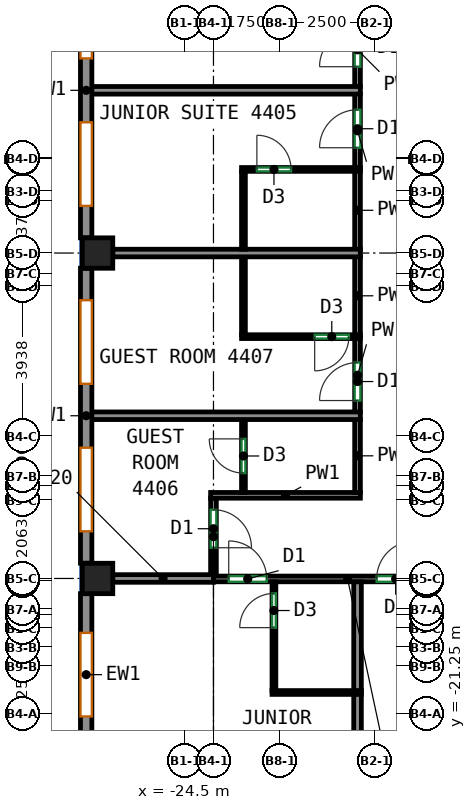
"""IFC4 building model, lengths in metres.
Left out: names, types, materials, properties, quantities, classifications, styles, units other than length and angle.
Written with IfcOpenShell. Run it as: python <this file> out.ifc"""

import sys

from ifc_helpers import new_model, si_unit, direction, frame, frame_2d, origin, origin_2d, place, context, subcontext, project, spatial, rectangle, extrude, source, transform, mapped, element, fill, save


model = new_model("IFC4")
c1 = context("Model", 3, precision=1e-05, world=origin(), true_north=direction((0.0, 1.0)))
c2 = subcontext(c1, "Body", "Model", "MODEL_VIEW")
j1 = project(units=[si_unit("LENGTHUNIT", "METRE"), si_unit("PLANEANGLEUNIT", "RADIAN")], contexts=[c1])
p1 = place(None, origin())
s1 = spatial("IfcSite", under=j1, at=p1, CompositionType="ELEMENT")
p2 = place(p1, origin())
s2 = spatial("IfcBuilding", under=s1, at=p2, CompositionType="ELEMENT")
p3 = place(p2, frame((0.0, 0.0, 185.5)))
s3 = spatial("IfcBuildingStorey", under=s2, at=p3, CompositionType="ELEMENT", Elevation=185.5)
m1 = source(origin(), c2, "Body", "SweptSolid", [
    extrude(rectangle(XDim=0.8, YDim=0.8, at=origin_2d()), origin(), (0.0, 0.0, 1.0), 3.12),
])
for number, where, z_axis, x_axis in (
    (1, (-26.8, -17.688, 0.0), (0.0, 0.0, 1.0), (1.0, 0.0, 0.0)),
    (2, (-26.8, -9.125, 0.0), (0.0, 0.0, 1.0), (1.0, 0.0, 0.0)),
):
    element("IfcColumn", number, at=place(p3, frame(where, z_axis=z_axis, x_axis=x_axis)), inside=s3, PredefinedType="COLUMN", context=c2, shape_type="MappedRepresentation", body=[
        mapped(m1, transform((0.0, 0.0, 0.0))),
    ])
m2 = source(origin(), c2, "Body", "SweptSolid", [
    extrude(rectangle(XDim=7.763, YDim=0.3, at=frame_2d((3.881, 0.0))), origin(), (0.0, 0.0, 1.0), 3.12),
])
p4 = place(p3, frame((-27.1, -0.962, 0.0), z_axis=(0.0, 0.0, 1.0), x_axis=(0.0, -1.0, 0.0)))
e3 = element("IfcWall", 3, at=p4, inside=s3, PredefinedType="SOLIDWALL", context=c2, shape_type="MappedRepresentation", body=[
    mapped(m2, transform((0.0, 0.0, 0.0))),
])
p5 = place(p4, frame((0.841, 0.0, 0.85)))
e4 = element("IfcOpeningElement", 4, at=p5, cuts=e3, PredefinedType="OPENING", context=c2, shape_type="SweptSolid", body=[
    extrude(rectangle(XDim=2.2, YDim=1.95, at=frame_2d((1.1, 0.975))), frame((0.0, 0.16, 0.0), z_axis=(0.0, -1.0, 0.0), x_axis=(1.0, 0.0, 0.0)), (0.0, 0.0, 1.0), 0.32),
])
p6 = place(p4, frame((4.722, 0.0, 0.85)))
e5 = element("IfcOpeningElement", 5, at=p6, cuts=e3, PredefinedType="OPENING", context=c2, shape_type="SweptSolid", body=[
    extrude(rectangle(XDim=2.2, YDim=1.95, at=frame_2d((1.1, 0.975))), frame((0.0, 0.16, 0.0), z_axis=(0.0, -1.0, 0.0), x_axis=(1.0, 0.0, 0.0)), (0.0, 0.0, 1.0), 0.32),
])
p7 = place(p3, frame((-27.1, -9.525, 0.0), z_axis=(0.0, 0.0, 1.0), x_axis=(0.0, -1.0, 0.0)))
e6 = element("IfcWall", 6, at=p7, inside=s3, PredefinedType="SOLIDWALL", context=c2, shape_type="MappedRepresentation", body=[
    mapped(m2, transform((0.0, 0.0, 0.0))),
])
p8 = place(p7, frame((0.841, 0.0, 0.85)))
e7 = element("IfcOpeningElement", 7, at=p8, cuts=e6, PredefinedType="OPENING", context=c2, shape_type="SweptSolid", body=[
    extrude(rectangle(XDim=2.2, YDim=1.95, at=frame_2d((1.1, 0.975))), frame((0.0, 0.16, 0.0), z_axis=(0.0, -1.0, 0.0), x_axis=(1.0, 0.0, 0.0)), (0.0, 0.0, 1.0), 0.32),
])
p9 = place(p7, frame((4.722, 0.0, 0.85)))
e8 = element("IfcOpeningElement", 8, at=p9, cuts=e6, PredefinedType="OPENING", context=c2, shape_type="SweptSolid", body=[
    extrude(rectangle(XDim=2.2, YDim=1.95, at=frame_2d((1.1, 0.975))), frame((0.0, 0.16, 0.0), z_axis=(0.0, -1.0, 0.0), x_axis=(1.0, 0.0, 0.0)), (0.0, 0.0, 1.0), 0.32),
])
m3 = source(origin(), c2, "Body", "SweptSolid", [
    extrude(rectangle(XDim=4.263, YDim=0.3, at=frame_2d((2.131, 0.0))), origin(), (0.0, 0.0, 1.0), 3.12),
])
p10 = place(p3, frame((-27.1, -18.087, 0.0), z_axis=(0.0, 0.0, 1.0), x_axis=(0.0, -1.0, 0.0)))
e9 = element("IfcWall", 9, at=p10, inside=s3, PredefinedType="SOLIDWALL", context=c2, shape_type="MappedRepresentation", body=[
    mapped(m3, transform((0.0, 0.0, 0.0))),
])
p11 = place(p10, frame((1.031, 0.0, 0.85)))
e10 = element("IfcOpeningElement", 10, at=p11, cuts=e9, PredefinedType="OPENING", context=c2, shape_type="SweptSolid", body=[
    extrude(rectangle(XDim=2.2, YDim=1.95, at=frame_2d((1.1, 0.975))), frame((0.0, 0.16, 0.0), z_axis=(0.0, -1.0, 0.0), x_axis=(1.0, 0.0, 0.0)), (0.0, 0.0, 1.0), 0.32),
])
p12 = place(p3, frame((-23.75, -17.7, 0.0), z_axis=(0.0, 0.0, 1.0), x_axis=(1.0, 0.0, 0.0)))
e11 = element("IfcWall", 11, at=p12, inside=s3, PredefinedType="PARTITIONING", context=c2, shape_type="SweptSolid", body=[
    extrude(rectangle(XDim=7.058, YDim=0.15, at=frame_2d((3.529, 0.0))), origin(), (0.0, 0.0, 1.0), 2.52),
])
p13 = place(p12, frame((0.401, 0.0, 0.0)))
e12 = element("IfcOpeningElement", 12, at=p13, cuts=e11, PredefinedType="OPENING", context=c2, shape_type="SweptSolid", body=[
    extrude(rectangle(XDim=1.0, YDim=2.1, at=frame_2d((0.5, 1.05))), frame((0.0, 0.085, 0.0), z_axis=(0.0, -1.0, 0.0), x_axis=(1.0, 0.0, 0.0)), (0.0, 0.0, 1.0), 0.17),
])
p14 = place(p12, frame((4.294, 0.0, 0.0)))
e13 = element("IfcOpeningElement", 13, at=p14, cuts=e11, PredefinedType="OPENING", context=c2, shape_type="SweptSolid", body=[
    extrude(rectangle(XDim=1.0, YDim=2.1, at=frame_2d((0.5, 1.05))), frame((0.0, 0.085, 0.0), z_axis=(0.0, -1.0, 0.0), x_axis=(1.0, 0.0, 0.0)), (0.0, 0.0, 1.0), 0.17),
])
p15 = place(p3, frame((-23.75, -15.575, 0.0), z_axis=(0.0, 0.0, 1.0), x_axis=(0.0, -1.0, 0.0)))
e14 = element("IfcWall", 14, at=p15, inside=s3, PredefinedType="PARTITIONING", context=c2, shape_type="SweptSolid", body=[
    extrude(rectangle(XDim=2.023, YDim=0.15, at=frame_2d((1.011, 0.0))), origin(), (0.0, 0.0, 1.0), 2.52),
])
p16 = place(p15, frame((0.304, 0.0, 0.0)))
e15 = element("IfcOpeningElement", 15, at=p16, cuts=e14, PredefinedType="OPENING", context=c2, shape_type="SweptSolid", body=[
    extrude(rectangle(XDim=1.0, YDim=2.1, at=frame_2d((0.5, 1.05))), frame((0.0, 0.085, 0.0), z_axis=(0.0, -1.0, 0.0), x_axis=(1.0, 0.0, 0.0)), (0.0, 0.0, 1.0), 0.17),
])
p17 = place(p3, frame((-23.825, -15.5, 0.0), z_axis=(0.0, 0.0, 1.0), x_axis=(1.0, 0.0, 0.0)))
e16 = element("IfcWall", 16, at=p17, inside=s3, PredefinedType="PARTITIONING", context=c2, shape_type="SweptSolid", body=[
    extrude(rectangle(XDim=3.941, YDim=0.15, at=frame_2d((1.97, 0.0))), origin(), (0.0, 0.0, 1.0), 3.12),
])
p18 = place(p3, frame((-19.959, -15.425, 0.0), z_axis=(0.0, 0.0, 1.0), x_axis=(0.0, 1.0, 0.0)))
e17 = element("IfcWall", 17, at=p18, inside=s3, PredefinedType="PARTITIONING", context=c2, shape_type="SweptSolid", body=[
    extrude(rectangle(XDim=1.929, YDim=0.15, at=frame_2d((0.964, 0.0))), origin(), (0.0, 0.0, 1.0), 3.12),
])
p19 = place(p3, frame((-19.959, -13.316, 0.0), z_axis=(0.0, 0.0, 1.0), x_axis=(0.0, 1.0, 0.0)))
e18 = element("IfcWall", 18, at=p19, inside=s3, PredefinedType="PARTITIONING", context=c2, shape_type="SweptSolid", body=[
    extrude(rectangle(XDim=1.951, YDim=0.15, at=frame_2d((0.976, 0.0))), origin(), (0.0, 0.0, 1.0), 3.12),
])
p20 = place(p19, frame((0.31, 0.0, 0.0)))
e19 = element("IfcOpeningElement", 19, at=p20, cuts=e18, PredefinedType="OPENING", context=c2, shape_type="SweptSolid", body=[
    extrude(rectangle(XDim=1.0, YDim=2.1, at=frame_2d((0.5, 1.05))), frame((0.0, 0.085, 0.0), z_axis=(0.0, -1.0, 0.0), x_axis=(1.0, 0.0, 0.0)), (0.0, 0.0, 1.0), 0.17),
])
p21 = place(p3, frame((-19.959, -11.285, 0.0), z_axis=(0.0, 0.0, 1.0), x_axis=(0.0, 1.0, 0.0)))
e20 = element("IfcWall", 20, at=p21, inside=s3, PredefinedType="PARTITIONING", context=c2, shape_type="SweptSolid", body=[
    extrude(rectangle(XDim=2.07, YDim=0.15, at=frame_2d((1.035, 0.0))), origin(), (0.0, 0.0, 1.0), 3.12),
])
p22 = place(p3, frame((-19.959, -6.885, 0.0), z_axis=(0.0, 0.0, 1.0), x_axis=(0.0, 1.0, 0.0)))
e21 = element("IfcWall", 21, at=p22, inside=s3, PredefinedType="PARTITIONING", context=c2, shape_type="SweptSolid", body=[
    extrude(rectangle(XDim=1.952, YDim=0.15, at=frame_2d((0.976, 0.0))), origin(), (0.0, 0.0, 1.0), 3.12),
])
p23 = place(p22, frame((0.531, 0.0, 0.0)))
e22 = element("IfcOpeningElement", 22, at=p23, cuts=e21, PredefinedType="OPENING", context=c2, shape_type="SweptSolid", body=[
    extrude(rectangle(XDim=1.0, YDim=2.1, at=frame_2d((0.5, 1.05))), frame((0.0, 0.085, 0.0), z_axis=(0.0, -1.0, 0.0), x_axis=(1.0, 0.0, 0.0)), (0.0, 0.0, 1.0), 0.17),
])
p24 = place(p3, frame((-19.959, -9.035, 0.0), z_axis=(0.0, 0.0, 1.0), x_axis=(0.0, 1.0, 0.0)))
e23 = element("IfcWall", 23, at=p24, inside=s3, PredefinedType="PARTITIONING", context=c2, shape_type="SweptSolid", body=[
    extrude(rectangle(XDim=2.07, YDim=0.15, at=frame_2d((1.035, 0.0))), origin(), (0.0, 0.0, 1.0), 3.12),
])
p25 = place(p3, frame((-19.959, -4.753, 0.0), z_axis=(0.0, 0.0, 1.0), x_axis=(0.0, 1.0, 0.0)))
e24 = element("IfcWall", 24, at=p25, inside=s3, PredefinedType="PARTITIONING", context=c2, shape_type="SweptSolid", body=[
    extrude(rectangle(XDim=1.951, YDim=0.15, at=frame_2d((0.976, 0.0))), origin(), (0.0, 0.0, 1.0), 3.12),
])
p26 = place(p25, frame((0.531, 0.0, 0.0)))
e25 = element("IfcOpeningElement", 25, at=p26, cuts=e24, PredefinedType="OPENING", context=c2, shape_type="SweptSolid", body=[
    extrude(rectangle(XDim=1.0, YDim=2.1, at=frame_2d((0.5, 1.05))), frame((0.0, 0.085, 0.0), z_axis=(0.0, -1.0, 0.0), x_axis=(1.0, 0.0, 0.0)), (0.0, 0.0, 1.0), 0.17),
])
p27 = place(p3, frame((-22.159, -20.638, 0.0), z_axis=(0.0, 0.0, 1.0), x_axis=(0.0, 1.0, 0.0)))
e26 = element("IfcWall", 26, at=p27, inside=s3, PredefinedType="PARTITIONING", context=c2, shape_type="SweptSolid", body=[
    extrude(rectangle(XDim=2.861, YDim=0.1, at=frame_2d((1.43, 0.0))), origin(), (0.0, 0.0, 1.0), 3.12),
])
p28 = place(p27, frame((1.657, 0.0, 0.0)))
e27 = element("IfcOpeningElement", 27, at=p28, cuts=e26, PredefinedType="OPENING", context=c2, shape_type="SweptSolid", body=[
    extrude(rectangle(XDim=0.9, YDim=2.1, at=frame_2d((0.45, 1.05))), frame((0.0, 0.06, 0.0), z_axis=(0.0, -1.0, 0.0), x_axis=(1.0, 0.0, 0.0)), (0.0, 0.0, 1.0), 0.12),
])
p29 = place(p3, frame((-22.209, -20.688, 0.0), z_axis=(0.0, 0.0, 1.0), x_axis=(1.0, 0.0, 0.0)))
e28 = element("IfcWall", 28, at=p29, inside=s3, PredefinedType="PARTITIONING", context=c2, shape_type="SweptSolid", body=[
    extrude(rectangle(XDim=2.35, YDim=0.1, at=frame_2d((1.175, 0.0))), origin(), (0.0, 0.0, 1.0), 3.12),
])
p30 = place(p3, frame((-19.959, -26.0, 0.0), z_axis=(0.0, 0.0, 1.0), x_axis=(0.0, 1.0, 0.0)))
e29 = element("IfcWall", 29, at=p30, inside=s3, PredefinedType="PARTITIONING", context=c2, shape_type="SweptSolid", body=[
    extrude(rectangle(XDim=5.262, YDim=0.2, at=frame_2d((2.631, 0.0))), origin(), (0.0, 0.0, 1.0), 3.12),
])
p31 = place(p3, frame((-26.4, -17.688, 0.0), z_axis=(0.0, 0.0, 1.0), x_axis=(1.0, 0.0, 0.0)))
e30 = element("IfcWall", 30, at=p31, inside=s3, PredefinedType="PARTITIONING", context=c2, shape_type="SweptSolid", body=[
    extrude(rectangle(XDim=2.648, YDim=0.2, at=frame_2d((1.324, 0.0))), origin(), (0.0, 0.0, 1.0), 2.52),
])
p32 = place(p3, frame((-19.959, -20.638, 0.0), z_axis=(0.0, 0.0, 1.0), x_axis=(0.0, 1.0, 0.0)))
e31 = element("IfcWall", 31, at=p32, inside=s3, PredefinedType="PARTITIONING", context=c2, shape_type="SweptSolid", body=[
    extrude(rectangle(XDim=2.861, YDim=0.2, at=frame_2d((1.43, 0.0))), origin(), (0.0, 0.0, 1.0), 3.12),
])
p33 = place(p3, frame((-22.961, -15.423, 0.0), z_axis=(0.0, 0.0, 1.0), x_axis=(0.0, 1.0, 0.0)))
e32 = element("IfcWall", 32, at=p33, inside=s3, PredefinedType="PARTITIONING", context=c2, shape_type="SweptSolid", body=[
    extrude(rectangle(XDim=1.917, YDim=0.1, at=frame_2d((0.958, 0.0))), origin(), (0.0, 0.0, 1.0), 3.12),
])
p34 = place(p33, frame((0.508, 0.0, 0.0)))
e33 = element("IfcOpeningElement", 33, at=p34, cuts=e32, PredefinedType="OPENING", context=c2, shape_type="SweptSolid", body=[
    extrude(rectangle(XDim=0.9, YDim=2.1, at=frame_2d((0.45, 1.05))), frame((0.0, 0.06, 0.0), z_axis=(0.0, -1.0, 0.0), x_axis=(1.0, 0.0, 0.0)), (0.0, 0.0, 1.0), 0.12),
])
p35 = place(p3, frame((-27.0, -13.406, 0.0), z_axis=(0.0, 0.0, 1.0), x_axis=(1.0, 0.0, 0.0)))
e34 = element("IfcWall", 34, at=p35, inside=s3, PredefinedType="PARTITIONING", context=c2, shape_type="SweptSolid", body=[
    extrude(rectangle(XDim=7.114, YDim=0.2, at=frame_2d((3.557, 0.0))), origin(), (0.0, 0.0, 1.0), 3.12),
])
p36 = place(p3, frame((-19.886, -11.325, 0.0), z_axis=(0.0, 0.0, 1.0), x_axis=(-1.0, 0.0, 0.0)))
e35 = element("IfcWall", 35, at=p36, inside=s3, PredefinedType="PARTITIONING", context=c2, shape_type="SweptSolid", body=[
    extrude(rectangle(XDim=3.125, YDim=0.1, at=frame_2d((1.562, 0.0))), origin(), (0.0, 0.0, 1.0), 3.12),
])
p37 = place(p36, frame((0.301, 0.0, 0.0)))
e36 = element("IfcOpeningElement", 36, at=p37, cuts=e35, PredefinedType="OPENING", context=c2, shape_type="SweptSolid", body=[
    extrude(rectangle(XDim=0.9, YDim=2.1, at=frame_2d((0.45, 1.05))), frame((0.0, 0.06, 0.0), z_axis=(0.0, -1.0, 0.0), x_axis=(1.0, 0.0, 0.0)), (0.0, 0.0, 1.0), 0.12),
])
p38 = place(p3, frame((-22.961, -11.275, 0.0), z_axis=(0.0, 0.0, 1.0), x_axis=(0.0, 1.0, 0.0)))
e37 = element("IfcWall", 37, at=p38, inside=s3, PredefinedType="PARTITIONING", context=c2, shape_type="SweptSolid", body=[
    extrude(rectangle(XDim=2.05, YDim=0.1, at=frame_2d((1.025, 0.0))), origin(), (0.0, 0.0, 1.0), 3.12),
])
p39 = place(p3, frame((-26.4, -9.125, 0.0), z_axis=(0.0, 0.0, 1.0), x_axis=(1.0, 0.0, 0.0)))
e38 = element("IfcWall", 38, at=p39, inside=s3, PredefinedType="PARTITIONING", context=c2, shape_type="SweptSolid", body=[
    extrude(rectangle(XDim=6.514, YDim=0.2, at=frame_2d((3.257, 0.0))), origin(), (0.0, 0.0, 1.0), 3.12),
])
p40 = place(p3, frame((-23.011, -6.925, 0.0), z_axis=(0.0, 0.0, 1.0), x_axis=(1.0, 0.0, 0.0)))
e39 = element("IfcWall", 39, at=p40, inside=s3, PredefinedType="PARTITIONING", context=c2, shape_type="SweptSolid", body=[
    extrude(rectangle(XDim=3.125, YDim=0.1, at=frame_2d((1.562, 0.0))), origin(), (0.0, 0.0, 1.0), 3.12),
])
p41 = place(p40, frame((0.403, 0.0, 0.0)))
e40 = element("IfcOpeningElement", 40, at=p41, cuts=e39, PredefinedType="OPENING", context=c2, shape_type="SweptSolid", body=[
    extrude(rectangle(XDim=0.9, YDim=2.1, at=frame_2d((0.45, 1.05))), frame((0.0, 0.06, 0.0), z_axis=(0.0, -1.0, 0.0), x_axis=(1.0, 0.0, 0.0)), (0.0, 0.0, 1.0), 0.12),
])
p42 = place(p3, frame((-22.961, -9.025, 0.0), z_axis=(0.0, 0.0, 1.0), x_axis=(0.0, 1.0, 0.0)))
e41 = element("IfcWall", 41, at=p42, inside=s3, PredefinedType="PARTITIONING", context=c2, shape_type="SweptSolid", body=[
    extrude(rectangle(XDim=2.05, YDim=0.1, at=frame_2d((1.025, 0.0))), origin(), (0.0, 0.0, 1.0), 3.12),
])
p43 = place(p3, frame((-27.0, -4.843, 0.0), z_axis=(0.0, 0.0, 1.0), x_axis=(1.0, 0.0, 0.0)))
e42 = element("IfcWall", 42, at=p43, inside=s3, PredefinedType="PARTITIONING", context=c2, shape_type="SweptSolid", body=[
    extrude(rectangle(XDim=7.114, YDim=0.2, at=frame_2d((3.557, 0.0))), origin(), (0.0, 0.0, 1.0), 3.12),
])
p44 = place(p5, origin())
e43 = element("IfcWindow", 43, at=p44, inside=s3, PartitioningType="SINGLE_PANEL", PredefinedType="WINDOW", context=c2, shape_type="SweptSolid", body=[
    extrude(rectangle(XDim=2.2, YDim=1.95, at=frame_2d((1.1, 0.975))), frame((0.0, 0.03, 0.0), z_axis=(0.0, -1.0, 0.0), x_axis=(1.0, 0.0, 0.0)), (0.0, 0.0, 1.0), 0.06),
])
fill(e4, e43)
p45 = place(p6, origin())
e44 = element("IfcWindow", 44, at=p45, inside=s3, PartitioningType="SINGLE_PANEL", PredefinedType="WINDOW", context=c2, shape_type="SweptSolid", body=[
    extrude(rectangle(XDim=2.2, YDim=1.95, at=frame_2d((1.1, 0.975))), frame((0.0, 0.03, 0.0), z_axis=(0.0, -1.0, 0.0), x_axis=(1.0, 0.0, 0.0)), (0.0, 0.0, 1.0), 0.06),
])
fill(e5, e44)
p46 = place(p8, origin())
e45 = element("IfcWindow", 45, at=p46, inside=s3, PartitioningType="SINGLE_PANEL", PredefinedType="WINDOW", context=c2, shape_type="SweptSolid", body=[
    extrude(rectangle(XDim=2.2, YDim=1.95, at=frame_2d((1.1, 0.975))), frame((0.0, 0.03, 0.0), z_axis=(0.0, -1.0, 0.0), x_axis=(1.0, 0.0, 0.0)), (0.0, 0.0, 1.0), 0.06),
])
fill(e7, e45)
p47 = place(p9, origin())
e46 = element("IfcWindow", 46, at=p47, inside=s3, PartitioningType="SINGLE_PANEL", PredefinedType="WINDOW", context=c2, shape_type="SweptSolid", body=[
    extrude(rectangle(XDim=2.2, YDim=1.95, at=frame_2d((1.1, 0.975))), frame((0.0, 0.03, 0.0), z_axis=(0.0, -1.0, 0.0), x_axis=(1.0, 0.0, 0.0)), (0.0, 0.0, 1.0), 0.06),
])
fill(e8, e46)
p48 = place(p11, origin())
e47 = element("IfcWindow", 47, at=p48, inside=s3, PartitioningType="SINGLE_PANEL", PredefinedType="WINDOW", context=c2, shape_type="SweptSolid", body=[
    extrude(rectangle(XDim=2.2, YDim=1.95, at=frame_2d((1.1, 0.975))), frame((0.0, 0.03, 0.0), z_axis=(0.0, -1.0, 0.0), x_axis=(1.0, 0.0, 0.0)), (0.0, 0.0, 1.0), 0.06),
])
fill(e10, e47)
p49 = place(p28, origin())
e48 = element("IfcDoor", 48, at=p49, inside=s3, OperationType="SINGLE_SWING_LEFT", PredefinedType="DOOR", context=c2, shape_type="SweptSolid", body=[
    extrude(rectangle(XDim=0.9, YDim=2.1, at=frame_2d((0.45, 1.05))), frame((0.0, 0.025, 0.0), z_axis=(0.0, -1.0, 0.0), x_axis=(1.0, 0.0, 0.0)), (0.0, 0.0, 1.0), 0.05),
])
fill(e27, e48)
p50 = place(p13, origin())
e49 = element("IfcDoor", 49, at=p50, inside=s3, OperationType="SINGLE_SWING_LEFT", PredefinedType="DOOR", context=c2, shape_type="SweptSolid", body=[
    extrude(rectangle(XDim=1.0, YDim=2.1, at=frame_2d((0.5, 1.05))), frame((0.0, 0.025, 0.0), z_axis=(0.0, -1.0, 0.0), x_axis=(1.0, 0.0, 0.0)), (0.0, 0.0, 1.0), 0.05),
])
fill(e12, e49)
p51 = place(p14, origin())
e50 = element("IfcDoor", 50, at=p51, inside=s3, OperationType="SINGLE_SWING_RIGHT", PredefinedType="DOOR", context=c2, shape_type="SweptSolid", body=[
    extrude(rectangle(XDim=1.0, YDim=2.1, at=frame_2d((0.5, 1.05))), frame((0.0, 0.025, 0.0), z_axis=(0.0, -1.0, 0.0), x_axis=(1.0, 0.0, 0.0)), (0.0, 0.0, 1.0), 0.05),
])
fill(e13, e50)
p52 = place(p16, origin())
e51 = element("IfcDoor", 51, at=p52, inside=s3, OperationType="SINGLE_SWING_RIGHT", PredefinedType="DOOR", context=c2, shape_type="SweptSolid", body=[
    extrude(rectangle(XDim=1.0, YDim=2.1, at=frame_2d((0.5, 1.05))), frame((0.0, 0.025, 0.0), z_axis=(0.0, -1.0, 0.0), x_axis=(1.0, 0.0, 0.0)), (0.0, 0.0, 1.0), 0.05),
])
fill(e15, e51)
p53 = place(p34, origin())
e52 = element("IfcDoor", 52, at=p53, inside=s3, OperationType="SINGLE_SWING_RIGHT", PredefinedType="DOOR", context=c2, shape_type="SweptSolid", body=[
    extrude(rectangle(XDim=0.9, YDim=2.1, at=frame_2d((0.45, 1.05))), frame((0.0, 0.025, 0.0), z_axis=(0.0, -1.0, 0.0), x_axis=(1.0, 0.0, 0.0)), (0.0, 0.0, 1.0), 0.05),
])
fill(e33, e52)
p54 = place(p20, origin())
e53 = element("IfcDoor", 53, at=p54, inside=s3, OperationType="SINGLE_SWING_LEFT", PredefinedType="DOOR", context=c2, shape_type="SweptSolid", body=[
    extrude(rectangle(XDim=1.0, YDim=2.1, at=frame_2d((0.5, 1.05))), frame((0.0, 0.025, 0.0), z_axis=(0.0, -1.0, 0.0), x_axis=(1.0, 0.0, 0.0)), (0.0, 0.0, 1.0), 0.05),
])
fill(e19, e53)
p55 = place(p37, origin())
e54 = element("IfcDoor", 54, at=p55, inside=s3, OperationType="SINGLE_SWING_RIGHT", PredefinedType="DOOR", context=c2, shape_type="SweptSolid", body=[
    extrude(rectangle(XDim=0.9, YDim=2.1, at=frame_2d((0.45, 1.05))), frame((0.0, 0.025, 0.0), z_axis=(0.0, -1.0, 0.0), x_axis=(1.0, 0.0, 0.0)), (0.0, 0.0, 1.0), 0.05),
])
fill(e36, e54)
p56 = place(p41, origin())
e55 = element("IfcDoor", 55, at=p56, inside=s3, OperationType="SINGLE_SWING_LEFT", PredefinedType="DOOR", context=c2, shape_type="SweptSolid", body=[
    extrude(rectangle(XDim=0.9, YDim=2.1, at=frame_2d((0.45, 1.05))), frame((0.0, 0.025, 0.0), z_axis=(0.0, -1.0, 0.0), x_axis=(1.0, 0.0, 0.0)), (0.0, 0.0, 1.0), 0.05),
])
fill(e40, e55)
p57 = place(p23, origin())
e56 = element("IfcDoor", 56, at=p57, inside=s3, OperationType="SINGLE_SWING_LEFT", PredefinedType="DOOR", context=c2, shape_type="SweptSolid", body=[
    extrude(rectangle(XDim=1.0, YDim=2.1, at=frame_2d((0.5, 1.05))), frame((0.0, 0.025, 0.0), z_axis=(0.0, -1.0, 0.0), x_axis=(1.0, 0.0, 0.0)), (0.0, 0.0, 1.0), 0.05),
])
fill(e22, e56)
p58 = place(p26, origin())
e57 = element("IfcDoor", 57, at=p58, inside=s3, OperationType="SINGLE_SWING_LEFT", PredefinedType="DOOR", context=c2, shape_type="SweptSolid", body=[
    extrude(rectangle(XDim=1.0, YDim=2.1, at=frame_2d((0.5, 1.05))), frame((0.0, 0.025, 0.0), z_axis=(0.0, -1.0, 0.0), x_axis=(1.0, 0.0, 0.0)), (0.0, 0.0, 1.0), 0.05),
])
fill(e25, e57)
save(model, sys.argv[1])
